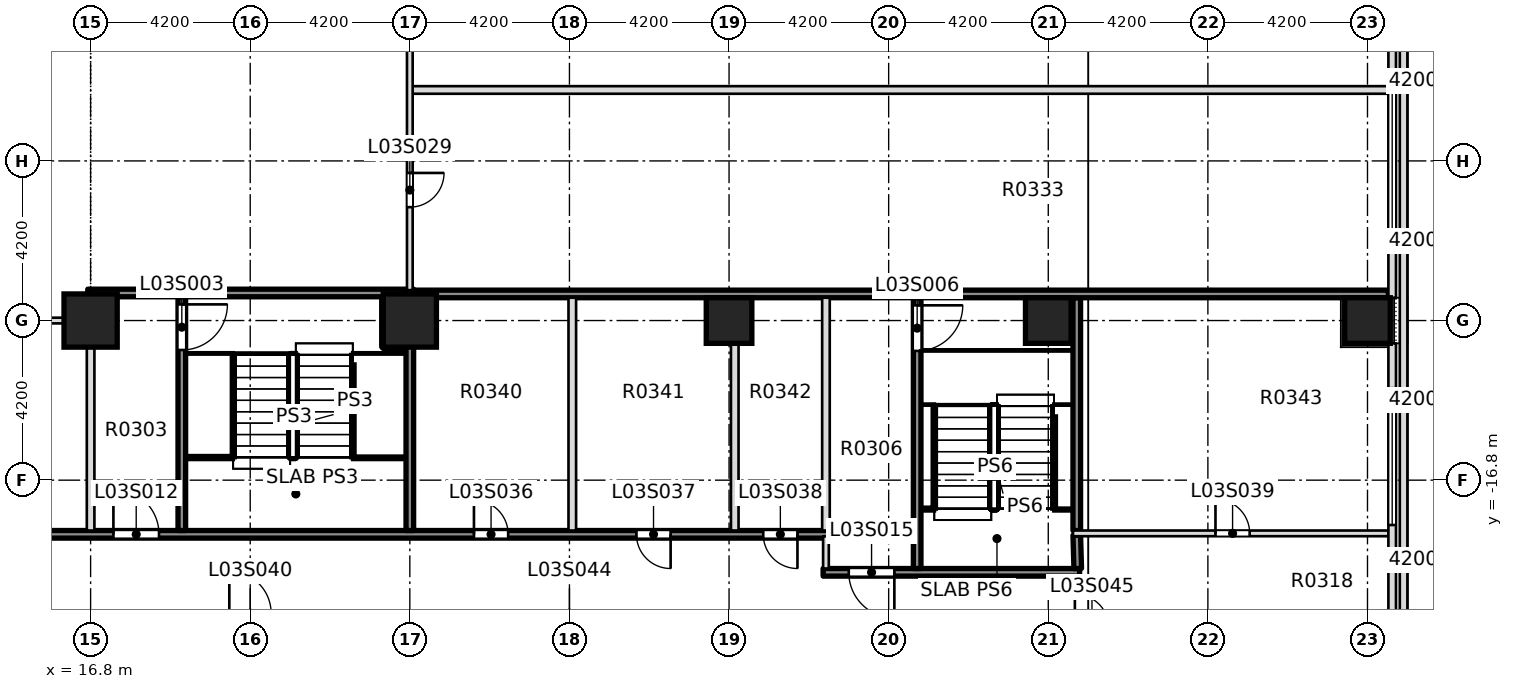
"""IFC4 building model, lengths in metres.
Left out: names, types, materials, properties, quantities, classifications, styles, units other than length and angle.
Written with IfcOpenShell. Run it as: python <this file> out.ifc"""

import sys

from ifc_helpers import new_model, si_unit, direction, frame, frame_2d, origin, origin_2d, place, context, subcontext, project, spatial, rectangle, extrude, element, fill, save


model = new_model("IFC4")
c1 = context("Model", 3, precision=1e-05, world=origin(), true_north=direction((0.0, 1.0)))
c2 = subcontext(c1, "Body", "Model", "MODEL_VIEW")
j1 = project(units=[si_unit("LENGTHUNIT", "METRE"), si_unit("PLANEANGLEUNIT", "RADIAN")], contexts=[c1])
p1 = place(None, origin())
s1 = spatial("IfcSite", under=j1, at=p1, CompositionType="ELEMENT")
p2 = place(p1, origin())
s2 = spatial("IfcBuilding", under=s1, at=p2, CompositionType="ELEMENT")
p3 = place(p2, frame((0.0, 0.0, 20.0)))
s3 = spatial("IfcBuildingStorey", under=s2, at=p3, CompositionType="ELEMENT", Elevation=20.0)
for number, where, z_axis, x_axis in (
    (1, (16.8, -12.6, -0.4), (0.0, 0.0, 1.0), (1.0, 0.0, 0.0)),
    (2, (25.2, -12.6, -0.4), (0.0, 0.0, 1.0), (1.0, 0.0, 0.0)),
):
    element("IfcColumn", number, at=place(p3, frame(where, z_axis=z_axis, x_axis=x_axis)), inside=s3, PredefinedType="COLUMN", context=c2, shape_type="SweptSolid", body=[
        extrude(rectangle(XDim=1.4, YDim=1.4, at=origin_2d()), origin(), (0.0, 0.0, 1.0), 5.0),
    ])
for number, where, z_axis, x_axis in (
    (3, (33.6, -12.6, -0.4), (0.0, 0.0, 1.0), (1.0, 0.0, 0.0)),
    (4, (42.0, -12.6, -0.4), (0.0, 0.0, 1.0), (1.0, 0.0, 0.0)),
):
    element("IfcColumn", number, at=place(p3, frame(where, z_axis=z_axis, x_axis=x_axis)), inside=s3, PredefinedType="COLUMN", context=c2, shape_type="SweptSolid", body=[
        extrude(rectangle(XDim=1.2, YDim=1.2, at=origin_2d()), origin(), (0.0, 0.0, 1.0), 5.4),
    ])
p4 = place(p3, frame((50.4, -12.6, 0.0), z_axis=(0.0, 0.0, 1.0), x_axis=(1.0, 0.0, 0.0)))
e5 = element("IfcColumn", 5, at=p4, inside=s3, PredefinedType="COLUMN", context=c2, shape_type="SweptSolid", body=[
    extrude(rectangle(XDim=1.2, YDim=1.2, at=origin_2d()), origin(), (0.0, 0.0, 1.0), 4.6),
])
p5 = place(p3, frame((51.35, -30.25, 5.0), z_axis=(0.0, 0.0, 1.0), x_axis=(0.0, 1.0, 0.0)))
e6 = element("IfcWall", 6, at=p5, inside=s3, PredefinedType="PARAPET", context=c2, shape_type="SweptSolid", body=[
    extrude(rectangle(XDim=60.5, YDim=0.2, at=frame_2d((30.25, 0.0))), origin(), (0.0, 0.0, 1.0), 1.2),
])
p6 = place(p3, frame((36.075, -19.225, 0.0), z_axis=(0.0, 0.0, 1.0), x_axis=(1.0, 0.0, 0.0)))
e7 = element("IfcWall", 7, at=p6, inside=s3, PredefinedType="SOLIDWALL", context=c2, shape_type="SweptSolid", body=[
    extrude(rectangle(XDim=6.75, YDim=0.2, at=frame_2d((3.375, 0.0))), origin(), (0.0, 0.0, 1.0), 4.6),
])
p7 = place(p6, frame((0.675, 0.0, 0.0)))
e8 = element("IfcOpeningElement", 8, at=p7, cuts=e7, PredefinedType="OPENING", context=c2, shape_type="SweptSolid", body=[
    extrude(rectangle(XDim=1.2, YDim=2.1, at=frame_2d((0.6, 1.05))), frame((0.0, 0.11, 0.0), z_axis=(0.0, -1.0, 0.0), x_axis=(1.0, 0.0, 0.0)), (0.0, 0.0, 1.0), 0.22),
])
p8 = place(p3, frame((12.25, -18.225, 0.0), z_axis=(0.0, 0.0, 1.0), x_axis=(1.0, 0.0, 0.0)))
e9 = element("IfcWall", 9, at=p8, inside=s3, PredefinedType="SOLIDWALL", context=c2, shape_type="SweptSolid", body=[
    extrude(rectangle(XDim=24.0, YDim=0.2, at=frame_2d((12.0, 0.0))), origin(), (0.0, 0.0, 1.0), 4.6),
])
p9 = place(p8, frame((5.15, 0.0, 0.0)))
e10 = element("IfcOpeningElement", 10, at=p9, cuts=e9, PredefinedType="OPENING", context=c2, shape_type="SweptSolid", body=[
    extrude(rectangle(XDim=1.2, YDim=2.1, at=frame_2d((0.6, 1.05))), frame((0.0, 0.11, 0.0), z_axis=(0.0, -1.0, 0.0), x_axis=(1.0, 0.0, 0.0)), (0.0, 0.0, 1.0), 0.22),
])
p10 = place(p8, frame((14.637, 0.0, 0.0)))
e11 = element("IfcOpeningElement", 11, at=p10, cuts=e9, PredefinedType="OPENING", context=c2, shape_type="SweptSolid", body=[
    extrude(rectangle(XDim=0.9, YDim=2.1, at=frame_2d((0.45, 1.05))), frame((0.0, 0.11, 0.0), z_axis=(0.0, -1.0, 0.0), x_axis=(1.0, 0.0, 0.0)), (0.0, 0.0, 1.0), 0.22),
])
p11 = place(p8, frame((18.913, 0.0, 0.0)))
e12 = element("IfcOpeningElement", 12, at=p11, cuts=e9, PredefinedType="OPENING", context=c2, shape_type="SweptSolid", body=[
    extrude(rectangle(XDim=0.9, YDim=2.1, at=frame_2d((0.45, 1.05))), frame((0.0, 0.11, 0.0), z_axis=(0.0, -1.0, 0.0), x_axis=(1.0, 0.0, 0.0)), (0.0, 0.0, 1.0), 0.22),
])
p12 = place(p8, frame((22.25, 0.0, 0.0)))
e13 = element("IfcOpeningElement", 13, at=p12, cuts=e9, PredefinedType="OPENING", context=c2, shape_type="SweptSolid", body=[
    extrude(rectangle(XDim=0.9, YDim=2.1, at=frame_2d((0.45, 1.05))), frame((0.0, 0.11, 0.0), z_axis=(0.0, -1.0, 0.0), x_axis=(1.0, 0.0, 0.0)), (0.0, 0.0, 1.0), 0.22),
])
p13 = place(p8, frame((1.825, 0.0, 0.0)))
e14 = element("IfcOpeningElement", 14, at=p13, cuts=e9, PredefinedType="OPENING", context=c2, shape_type="SweptSolid", body=[
    extrude(rectangle(XDim=0.7, YDim=2.1, at=frame_2d((0.35, 1.05))), frame((0.0, 0.11, 0.0), z_axis=(0.0, -1.0, 0.0), x_axis=(1.0, 0.0, 0.0)), (0.0, 0.0, 1.0), 0.22),
])
p14 = place(p3, frame((42.65, -18.2, 0.0), z_axis=(0.0, 0.0, 1.0), x_axis=(1.0, 0.0, 0.0)))
e15 = element("IfcWall", 15, at=p14, inside=s3, PredefinedType="PARTITIONING", context=c2, shape_type="SweptSolid", body=[
    extrude(rectangle(XDim=8.3, YDim=0.15, at=frame_2d((4.15, 0.0))), origin(), (0.0, 0.0, 1.0), 4.6),
])
p15 = place(p14, frame((3.75, 0.0, 0.0)))
e16 = element("IfcOpeningElement", 16, at=p15, cuts=e15, PredefinedType="OPENING", context=c2, shape_type="SweptSolid", body=[
    extrude(rectangle(XDim=0.9, YDim=2.1, at=frame_2d((0.45, 1.05))), frame((0.0, 0.085, 0.0), z_axis=(0.0, -1.0, 0.0), x_axis=(1.0, 0.0, 0.0)), (0.0, 0.0, 1.0), 0.17),
])
p16 = place(p3, frame((7.275, -12.6, 0.0), z_axis=(0.0, 0.0, 1.0), x_axis=(1.0, 0.0, 0.0)))
e17 = element("IfcWall", 17, at=p16, inside=s3, PredefinedType="PARTITIONING", context=c2, shape_type="SweptSolid", body=[
    extrude(rectangle(XDim=9.625, YDim=0.15, at=frame_2d((4.812, 0.0))), origin(), (0.0, 0.0, 1.0), 4.6),
])
p17 = place(p3, frame((16.725, -11.875, 0.0), z_axis=(0.0, 0.0, 1.0), x_axis=(1.0, 0.0, 0.0)))
e18 = element("IfcWall", 18, at=p17, inside=s3, PredefinedType="SOLIDWALL", context=c2, shape_type="SweptSolid", body=[
    extrude(rectangle(XDim=8.575, YDim=0.2, at=frame_2d((4.288, 0.0))), origin(), (0.0, 0.0, 1.0), 4.6),
])
p18 = place(p3, frame((25.275, -6.533, 0.0), z_axis=(0.0, 0.0, 1.0), x_axis=(1.0, 0.0, 0.0)))
e19 = element("IfcWall", 19, at=p18, inside=s3, PredefinedType="PARTITIONING", context=c2, shape_type="SweptSolid", body=[
    extrude(rectangle(XDim=25.675, YDim=0.2, at=frame_2d((12.837, 0.0))), origin(), (0.0, 0.0, 1.0), 4.6),
])
p19 = place(p3, frame((16.8, -18.125, 0.0), z_axis=(0.0, 0.0, 1.0), x_axis=(0.0, 1.0, 0.0)))
e20 = element("IfcWall", 20, at=p19, inside=s3, PredefinedType="PARTITIONING", context=c2, shape_type="SweptSolid", body=[
    extrude(rectangle(XDim=5.45, YDim=0.2, at=frame_2d((2.725, 0.0))), origin(), (0.0, 0.0, 1.0), 4.6),
])
p20 = place(p3, frame((16.8, -12.525, 0.0), z_axis=(0.0, 0.0, 1.0), x_axis=(0.0, 1.0, 0.0)))
e21 = element("IfcWall", 21, at=p20, inside=s3, PredefinedType="PARTITIONING", context=c2, shape_type="SweptSolid", body=[
    extrude(rectangle(XDim=0.55, YDim=0.15, at=frame_2d((0.275, 0.0))), origin(), (0.0, 0.0, 1.0), 4.6),
])
p21 = place(p3, frame((19.2, -18.125, 0.0), z_axis=(0.0, 0.0, 1.0), x_axis=(0.0, 1.0, 0.0)))
e22 = element("IfcWall", 22, at=p21, inside=s3, PredefinedType="SOLIDWALL", context=c2, shape_type="SweptSolid", body=[
    extrude(rectangle(XDim=6.15, YDim=0.2, at=frame_2d((3.075, 0.0))), origin(), (0.0, 0.0, 1.0), 4.6),
])
p22 = place(p21, frame((4.75, 0.0, 0.0)))
e23 = element("IfcOpeningElement", 23, at=p22, cuts=e22, PredefinedType="OPENING", context=c2, shape_type="SweptSolid", body=[
    extrude(rectangle(XDim=1.2, YDim=2.1, at=frame_2d((0.6, 1.05))), frame((0.0, 0.11, 0.0), z_axis=(0.0, -1.0, 0.0), x_axis=(1.0, 0.0, 0.0)), (0.0, 0.0, 1.0), 0.22),
])
p23 = place(p3, frame((25.2, -18.125, 0.0), z_axis=(0.0, 0.0, 1.0), x_axis=(0.0, 1.0, 0.0)))
e24 = element("IfcWall", 24, at=p23, inside=s3, PredefinedType="SOLIDWALL", context=c2, shape_type="SweptSolid", body=[
    extrude(rectangle(XDim=6.125, YDim=0.2, at=frame_2d((3.062, 0.0))), origin(), (0.0, 0.0, 1.0), 4.6),
])
p24 = place(p3, frame((25.2, -11.8, 0.0), z_axis=(0.0, 0.0, 1.0), x_axis=(0.0, 1.0, 0.0)))
e25 = element("IfcWall", 25, at=p24, inside=s3, PredefinedType="PARTITIONING", context=c2, shape_type="SweptSolid", body=[
    extrude(rectangle(XDim=24.3, YDim=0.15, at=frame_2d((12.15, 0.0))), origin(), (0.0, 0.0, 1.0), 4.6),
])
p25 = place(p24, frame((2.184, 0.0, 0.0)))
e26 = element("IfcOpeningElement", 26, at=p25, cuts=e25, PredefinedType="OPENING", context=c2, shape_type="SweptSolid", body=[
    extrude(rectangle(XDim=0.9, YDim=2.1, at=frame_2d((0.45, 1.05))), frame((0.0, 0.085, 0.0), z_axis=(0.0, -1.0, 0.0), x_axis=(1.0, 0.0, 0.0)), (0.0, 0.0, 1.0), 0.17),
])
p26 = place(p24, frame((8.4, 0.0, 0.0)))
e27 = element("IfcOpeningElement", 27, at=p26, cuts=e25, PredefinedType="OPENING", context=c2, shape_type="SweptSolid", body=[
    extrude(rectangle(XDim=0.9, YDim=2.1, at=frame_2d((0.45, 1.05))), frame((0.0, 0.085, 0.0), z_axis=(0.0, -1.0, 0.0), x_axis=(1.0, 0.0, 0.0)), (0.0, 0.0, 1.0), 0.17),
])
p27 = place(p24, frame((12.866, 0.0, 0.0)))
e28 = element("IfcOpeningElement", 28, at=p27, cuts=e25, PredefinedType="OPENING", context=c2, shape_type="SweptSolid", body=[
    extrude(rectangle(XDim=0.9, YDim=2.1, at=frame_2d((0.45, 1.05))), frame((0.0, 0.085, 0.0), z_axis=(0.0, -1.0, 0.0), x_axis=(1.0, 0.0, 0.0)), (0.0, 0.0, 1.0), 0.17),
])
p28 = place(p24, frame((16.8, 0.0, 0.0)))
e29 = element("IfcOpeningElement", 29, at=p28, cuts=e25, PredefinedType="OPENING", context=c2, shape_type="SweptSolid", body=[
    extrude(rectangle(XDim=0.9, YDim=2.1, at=frame_2d((0.45, 1.05))), frame((0.0, 0.085, 0.0), z_axis=(0.0, -1.0, 0.0), x_axis=(1.0, 0.0, 0.0)), (0.0, 0.0, 1.0), 0.17),
])
for number, where, z_axis, x_axis in (
    (30, (29.475, -18.125, 0.0), (0.0, 0.0, 1.0), (0.0, 1.0, 0.0)),
    (31, (33.75, -18.125, 0.0), (0.0, 0.0, 1.0), (0.0, 1.0, 0.0)),
):
    element("IfcWall", number, at=place(p3, frame(where, z_axis=z_axis, x_axis=x_axis)), inside=s3, PredefinedType="PARTITIONING", context=c2, shape_type="SweptSolid", body=[
        extrude(rectangle(XDim=6.125, YDim=0.2, at=frame_2d((3.062, 0.0))), origin(), (0.0, 0.0, 1.0), 4.6),
    ])
p29 = place(p3, frame((36.15, -19.125, 0.0), z_axis=(0.0, 0.0, 1.0), x_axis=(0.0, 1.0, 0.0)))
e32 = element("IfcWall", 32, at=p29, inside=s3, PredefinedType="PARTITIONING", context=c2, shape_type="SweptSolid", body=[
    extrude(rectangle(XDim=0.85, YDim=0.15, at=frame_2d((0.425, 0.0))), origin(), (0.0, 0.0, 1.0), 4.6),
])
p30 = place(p3, frame((36.15, -18.125, 0.0), z_axis=(0.0, 0.0, 1.0), x_axis=(0.0, 1.0, 0.0)))
e33 = element("IfcWall", 33, at=p30, inside=s3, PredefinedType="PARTITIONING", context=c2, shape_type="SweptSolid", body=[
    extrude(rectangle(XDim=6.125, YDim=0.2, at=frame_2d((3.062, 0.0))), origin(), (0.0, 0.0, 1.0), 4.6),
])
p31 = place(p3, frame((38.55, -19.125, 0.0), z_axis=(0.0, 0.0, 1.0), x_axis=(0.0, 1.0, 0.0)))
e34 = element("IfcWall", 34, at=p31, inside=s3, PredefinedType="SOLIDWALL", context=c2, shape_type="SweptSolid", body=[
    extrude(rectangle(XDim=7.125, YDim=0.2, at=frame_2d((3.562, 0.0))), origin(), (0.0, 0.0, 1.0), 4.6),
])
p32 = place(p31, frame((5.725, 0.0, 0.0)))
e35 = element("IfcOpeningElement", 35, at=p32, cuts=e34, PredefinedType="OPENING", context=c2, shape_type="SweptSolid", body=[
    extrude(rectangle(XDim=1.2, YDim=2.1, at=frame_2d((0.6, 1.05))), frame((0.0, 0.11, 0.0), z_axis=(0.0, -1.0, 0.0), x_axis=(1.0, 0.0, 0.0)), (0.0, 0.0, 1.0), 0.22),
])
p33 = place(p3, frame((42.775, -19.125, 0.0), z_axis=(0.0, 0.0, 1.0), x_axis=(-0.028448302746, 0.99959526513, 0.0)))
e36 = element("IfcWall", 36, at=p33, inside=s3, PredefinedType="SOLIDWALL", context=c2, shape_type="SweptSolid", body=[
    extrude(rectangle(XDim=0.875, YDim=0.2, at=frame_2d((0.438, 0.0))), origin(), (0.0, 0.0, 1.0), 4.6),
])
p34 = place(p3, frame((51.05, -20.4, 0.0), z_axis=(0.0, 0.0, 1.0), x_axis=(0.0, 1.0, 0.0)))
e37 = element("IfcWall", 37, at=p34, inside=s3, PredefinedType="STANDARD", context=c2, shape_type="SweptSolid", body=[
    extrude(rectangle(XDim=7.2, YDim=0.2, at=frame_2d((3.6, 0.0))), origin(), (0.0, 0.0, 1.0), 4.6),
])
p35 = place(p34, frame((2.42, 0.0, 0.9)))
e38 = element("IfcOpeningElement", 38, at=p35, cuts=e37, PredefinedType="OPENING", context=c2, shape_type="SweptSolid", body=[
    extrude(rectangle(XDim=3.6, YDim=2.8, at=frame_2d((1.8, 1.4))), frame((0.0, 0.11, 0.0), z_axis=(0.0, -1.0, 0.0), x_axis=(1.0, 0.0, 0.0)), (0.0, 0.0, 1.0), 0.22),
])
p36 = place(p3, frame((51.05, -12.0, 0.0), z_axis=(0.0, 0.0, 1.0), x_axis=(0.0, 1.0, 0.0)))
e39 = element("IfcWall", 39, at=p36, inside=s3, PredefinedType="STANDARD", context=c2, shape_type="SweptSolid", body=[
    extrude(rectangle(XDim=7.2, YDim=0.2, at=frame_2d((3.6, 0.0))), origin(), (0.0, 0.0, 1.0), 4.6),
])
p37 = place(p36, frame((1.8, 0.0, 0.9)))
e40 = element("IfcOpeningElement", 40, at=p37, cuts=e39, PredefinedType="OPENING", context=c2, shape_type="SweptSolid", body=[
    extrude(rectangle(XDim=3.6, YDim=2.8, at=frame_2d((1.8, 1.4))), frame((0.0, 0.11, 0.0), z_axis=(0.0, -1.0, 0.0), x_axis=(1.0, 0.0, 0.0)), (0.0, 0.0, 1.0), 0.22),
])
p38 = place(p3, frame((42.75, -18.125, 0.0), z_axis=(0.0, 0.0, 1.0), x_axis=(0.0, 1.0, 0.0)))
e41 = element("IfcWall", 41, at=p38, inside=s3, PredefinedType="SOLIDWALL", context=c2, shape_type="SweptSolid", body=[
    extrude(rectangle(XDim=6.125, YDim=0.2, at=frame_2d((3.062, 0.0))), origin(), (0.0, 0.0, 1.0), 4.6),
])
p39 = place(p3, frame((25.1, -11.9, 0.0), z_axis=(0.0, 0.0, 1.0), x_axis=(1.0, 0.0, 0.0)))
e42 = element("IfcWall", 42, at=p39, inside=s3, PredefinedType="SOLIDWALL", context=c2, shape_type="SweptSolid", body=[
    extrude(rectangle(XDim=25.85, YDim=0.2, at=frame_2d((12.925, 0.0))), origin(), (0.0, 0.0, 1.0), 4.6),
])
p40 = place(p22, origin())
e43 = element("IfcDoor", 43, at=p40, inside=s3, OperationType="DOUBLE_DOOR_SINGLE_SWING", PredefinedType="DOOR", context=c2, shape_type="SweptSolid", body=[
    extrude(rectangle(XDim=1.2, YDim=2.1, at=frame_2d((0.6, 1.05))), frame((0.0, 0.025, 0.0), z_axis=(0.0, -1.0, 0.0), x_axis=(1.0, 0.0, 0.0)), (0.0, 0.0, 1.0), 0.05),
])
fill(e23, e43)
p41 = place(p32, origin())
e44 = element("IfcDoor", 44, at=p41, inside=s3, OperationType="DOUBLE_DOOR_SINGLE_SWING", PredefinedType="DOOR", context=c2, shape_type="SweptSolid", body=[
    extrude(rectangle(XDim=1.2, YDim=2.1, at=frame_2d((0.6, 1.05))), frame((0.0, 0.025, 0.0), z_axis=(0.0, -1.0, 0.0), x_axis=(1.0, 0.0, 0.0)), (0.0, 0.0, 1.0), 0.05),
])
fill(e35, e44)
p42 = place(p9, origin())
e45 = element("IfcDoor", 45, at=p42, inside=s3, OperationType="SINGLE_SWING_LEFT", PredefinedType="DOOR", context=c2, shape_type="SweptSolid", body=[
    extrude(rectangle(XDim=1.2, YDim=2.1, at=frame_2d((0.6, 1.05))), frame((0.0, 0.025, 0.0), z_axis=(0.0, -1.0, 0.0), x_axis=(1.0, 0.0, 0.0)), (0.0, 0.0, 1.0), 0.05),
])
fill(e10, e45)
p43 = place(p7, origin())
e46 = element("IfcDoor", 46, at=p43, inside=s3, OperationType="SINGLE_SWING_LEFT", PredefinedType="DOOR", context=c2, shape_type="SweptSolid", body=[
    extrude(rectangle(XDim=1.2, YDim=2.1, at=frame_2d((0.6, 1.05))), frame((0.0, 0.025, 0.0), z_axis=(0.0, -1.0, 0.0), x_axis=(1.0, 0.0, 0.0)), (0.0, 0.0, 1.0), 0.05),
])
fill(e8, e46)
p44 = place(p25, origin())
e47 = element("IfcDoor", 47, at=p44, inside=s3, OperationType="SINGLE_SWING_LEFT", PredefinedType="DOOR", context=c2, shape_type="SweptSolid", body=[
    extrude(rectangle(XDim=0.9, YDim=2.1, at=frame_2d((0.45, 1.05))), frame((0.0, 0.025, 0.0), z_axis=(0.0, -1.0, 0.0), x_axis=(1.0, 0.0, 0.0)), (0.0, 0.0, 1.0), 0.05),
])
fill(e26, e47)
p45 = place(p10, origin())
e48 = element("IfcDoor", 48, at=p45, inside=s3, OperationType="SINGLE_SWING_RIGHT", PredefinedType="DOOR", context=c2, shape_type="SweptSolid", body=[
    extrude(rectangle(XDim=0.9, YDim=2.1, at=frame_2d((0.45, 1.05))), frame((0.0, 0.025, 0.0), z_axis=(0.0, -1.0, 0.0), x_axis=(1.0, 0.0, 0.0)), (0.0, 0.0, 1.0), 0.05),
])
fill(e11, e48)
p46 = place(p11, origin())
e49 = element("IfcDoor", 49, at=p46, inside=s3, OperationType="SINGLE_SWING_LEFT", PredefinedType="DOOR", context=c2, shape_type="SweptSolid", body=[
    extrude(rectangle(XDim=0.9, YDim=2.1, at=frame_2d((0.45, 1.05))), frame((0.0, 0.025, 0.0), z_axis=(0.0, -1.0, 0.0), x_axis=(1.0, 0.0, 0.0)), (0.0, 0.0, 1.0), 0.05),
])
fill(e12, e49)
p47 = place(p12, origin())
e50 = element("IfcDoor", 50, at=p47, inside=s3, OperationType="SINGLE_SWING_LEFT", PredefinedType="DOOR", context=c2, shape_type="SweptSolid", body=[
    extrude(rectangle(XDim=0.9, YDim=2.1, at=frame_2d((0.45, 1.05))), frame((0.0, 0.025, 0.0), z_axis=(0.0, -1.0, 0.0), x_axis=(1.0, 0.0, 0.0)), (0.0, 0.0, 1.0), 0.05),
])
fill(e13, e50)
p48 = place(p15, origin())
e51 = element("IfcDoor", 51, at=p48, inside=s3, OperationType="SINGLE_SWING_LEFT", PredefinedType="DOOR", context=c2, shape_type="SweptSolid", body=[
    extrude(rectangle(XDim=0.9, YDim=2.1, at=frame_2d((0.45, 1.05))), frame((0.0, 0.025, 0.0), z_axis=(0.0, -1.0, 0.0), x_axis=(1.0, 0.0, 0.0)), (0.0, 0.0, 1.0), 0.05),
])
fill(e16, e51)
p49 = place(p35, origin())
e52 = element("IfcWindow", 52, at=p49, inside=s3, PartitioningType="SINGLE_PANEL", PredefinedType="WINDOW", context=c2, shape_type="SweptSolid", body=[
    extrude(rectangle(XDim=3.6, YDim=2.8, at=frame_2d((1.8, 1.4))), frame((0.0, 0.03, 0.0), z_axis=(0.0, -1.0, 0.0), x_axis=(1.0, 0.0, 0.0)), (0.0, 0.0, 1.0), 0.06),
])
fill(e38, e52)
p50 = place(p37, origin())
e53 = element("IfcWindow", 53, at=p50, inside=s3, PartitioningType="SINGLE_PANEL", PredefinedType="WINDOW", context=c2, shape_type="SweptSolid", body=[
    extrude(rectangle(XDim=3.6, YDim=2.8, at=frame_2d((1.8, 1.4))), frame((0.0, 0.03, 0.0), z_axis=(0.0, -1.0, 0.0), x_axis=(1.0, 0.0, 0.0)), (0.0, 0.0, 1.0), 0.06),
])
fill(e40, e53)
save(model, sys.argv[1])
